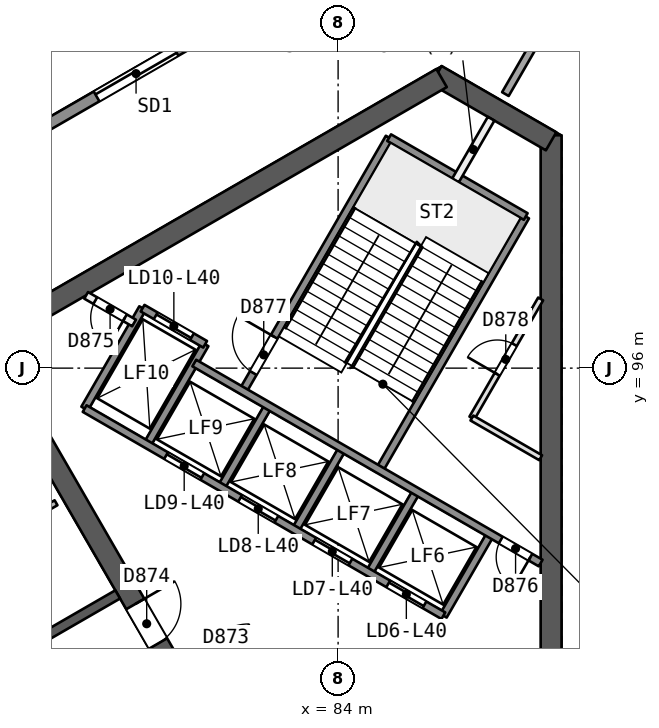
"""IFC4 building model, lengths in metres.
Left out: names, types, materials, properties, quantities, classifications, styles, units other than length and angle.
Written with IfcOpenShell. Run it as: python <this file> out.ifc"""

import sys

from ifc_helpers import new_model, si_unit, direction, frame, frame_2d, origin, place, context, subcontext, project, spatial, rectangle, extrude, element, fill, save


model = new_model("IFC4")
c1 = context("Model", 3, precision=1e-05, world=origin(), true_north=direction((0.0, 1.0)))
c2 = subcontext(c1, "Body", "Model", "MODEL_VIEW")
j1 = project(units=[si_unit("LENGTHUNIT", "METRE"), si_unit("PLANEANGLEUNIT", "RADIAN")], contexts=[c1])
p1 = place(None, origin())
s1 = spatial("IfcSite", under=j1, at=p1, CompositionType="ELEMENT")
p2 = place(p1, origin())
s2 = spatial("IfcBuilding", under=s1, at=p2, CompositionType="ELEMENT")
p3 = place(p2, frame((0.0, 0.0, 167.4)))
s3 = spatial("IfcBuildingStorey", under=s2, at=p3, CompositionType="ELEMENT", Elevation=167.4)
p4 = place(p3, frame((89.605, 88.069, 0.0), z_axis=(0.0, 0.0, 1.0), x_axis=(0.0, 1.0, 0.0)))
e1 = element("IfcWall", 1, at=p4, inside=s3, PredefinedType="SHEAR", context=c2, shape_type="SweptSolid", body=[
    extrude(rectangle(XDim=14.058, YDim=0.55, at=frame_2d((7.029, 0.0))), origin(), (0.0, 0.0, 1.0), 3.7),
])
p5 = place(p3, frame((89.605, 101.969, 0.0), z_axis=(0.0, 0.0, 1.0), x_axis=(-0.865997833373, 0.500047750313, 0.0)))
e2 = element("IfcWall", 2, at=p5, inside=s3, PredefinedType="SHEAR", context=c2, shape_type="SweptSolid", body=[
    extrude(rectangle(XDim=3.487, YDim=0.55, at=frame_2d((1.743, 0.0))), origin(), (0.0, 0.0, 1.0), 3.7),
])
p6 = place(p3, frame((86.723, 103.633, 0.0), z_axis=(0.0, 0.0, 1.0), x_axis=(-0.866023530946, -0.500003243837, 0.0)))
e3 = element("IfcWall", 3, at=p6, inside=s3, PredefinedType="SHEAR", context=c2, shape_type="SweptSolid", body=[
    extrude(rectangle(XDim=14.175, YDim=0.55, at=frame_2d((7.087, 0.0))), origin(), (0.0, 0.0, 1.0), 3.7),
])
p7 = place(p3, frame((74.686, 96.683, 0.0), z_axis=(0.0, 0.0, 1.0), x_axis=(0.499997818338, -0.866026663364, 0.0)))
e4 = element("IfcWall", 4, at=p7, inside=s3, PredefinedType="SHEAR", context=c2, shape_type="SweptSolid", body=[
    extrude(rectangle(XDim=10.105, YDim=0.55, at=frame_2d((5.052, 0.0))), origin(), (0.0, 0.0, 1.0), 3.7),
])
p8 = place(p7, frame((7.955, 0.0, 0.0)))
e5 = element("IfcOpeningElement", 5, at=p8, cuts=e4, PredefinedType="OPENING", context=c2, shape_type="SweptSolid", body=[
    extrude(rectangle(XDim=1.2, YDim=2.1, at=frame_2d((0.6, 1.05))), frame((0.0, 0.286, 0.0), z_axis=(0.0, -1.0, 0.0), x_axis=(1.0, 0.0, 0.0)), (0.0, 0.0, 1.0), 0.571),
])
p9 = place(p3, frame((78.2, 90.046, 0.0), z_axis=(0.0, 0.0, 1.0), x_axis=(-0.866026492143, -0.499998114903, 0.0)))
e6 = element("IfcWall", 6, at=p9, inside=s3, PredefinedType="SHEAR", context=c2, shape_type="SweptSolid", body=[
    extrude(rectangle(XDim=15.588, YDim=0.25, at=frame_2d((7.794, 0.0))), origin(), (0.0, 0.0, 1.0), 3.25),
])
p10 = place(p9, frame((3.138, 0.0, 0.0)))
e7 = element("IfcOpeningElement", 7, at=p10, cuts=e6, PredefinedType="OPENING", context=c2, shape_type="SweptSolid", body=[
    extrude(rectangle(XDim=1.0, YDim=2.1, at=frame_2d((0.5, 1.05))), frame((0.0, 0.135, 0.0), z_axis=(0.0, -1.0, 0.0), x_axis=(1.0, 0.0, 0.0)), (0.0, 0.0, 1.0), 0.271),
])
p11 = place(p9, frame((5.629, 0.0, 0.0)))
e8 = element("IfcOpeningElement", 8, at=p11, cuts=e6, PredefinedType="OPENING", context=c2, shape_type="SweptSolid", body=[
    extrude(rectangle(XDim=0.9, YDim=2.1, at=frame_2d((0.45, 1.05))), frame((0.0, 0.135, 0.0), z_axis=(0.0, -1.0, 0.0), x_axis=(1.0, 0.0, 0.0)), (0.0, 0.0, 1.0), 0.271),
])
p12 = place(p9, frame((8.435, 0.0, 0.0)))
e9 = element("IfcOpeningElement", 9, at=p12, cuts=e6, PredefinedType="OPENING", context=c2, shape_type="SweptSolid", body=[
    extrude(rectangle(XDim=0.9, YDim=2.1, at=frame_2d((0.45, 1.05))), frame((0.0, 0.135, 0.0), z_axis=(0.0, -1.0, 0.0), x_axis=(1.0, 0.0, 0.0)), (0.0, 0.0, 1.0), 0.271),
])
p13 = place(p9, frame((12.438, 0.0, 0.0)))
e10 = element("IfcOpeningElement", 10, at=p13, cuts=e6, PredefinedType="OPENING", context=c2, shape_type="SweptSolid", body=[
    extrude(rectangle(XDim=1.0, YDim=2.1, at=frame_2d((0.5, 1.05))), frame((0.0, 0.135, 0.0), z_axis=(0.0, -1.0, 0.0), x_axis=(1.0, 0.0, 0.0)), (0.0, 0.0, 1.0), 0.271),
])
p14 = place(p3, frame((91.267, 108.173, 0.0), z_axis=(0.0, 0.0, 1.0), x_axis=(-0.499979412418, -0.866037289704, 0.0)))
e11 = element("IfcWall", 11, at=p14, inside=s3, PredefinedType="PARTITIONING", context=c2, shape_type="SweptSolid", body=[
    extrude(rectangle(XDim=5.73, YDim=0.2, at=frame_2d((2.865, 0.0))), origin(), (0.0, 0.0, 1.0), 3.25),
])
p15 = place(p3, frame((74.498, 91.257, 0.0), z_axis=(0.0, 0.0, 1.0), x_axis=(0.866038271014, 0.499977712642, 0.0)))
e12 = element("IfcWall", 12, at=p15, inside=s3, PredefinedType="PARTITIONING", context=c2, shape_type="SweptSolid", body=[
    extrude(rectangle(XDim=2.401, YDim=0.15, at=frame_2d((1.2, 0.0))), origin(), (0.0, 0.0, 1.0), 3.25),
])
p16 = place(p3, frame((42.319, 82.755, 0.0), z_axis=(0.0, 0.0, 1.0), x_axis=(0.866024017239, 0.50000240156, 0.0)))
e13 = element("IfcWall", 13, at=p16, inside=s3, PredefinedType="SOLIDWALL", context=c2, shape_type="SweptSolid", body=[
    extrude(rectangle(XDim=53.85, YDim=0.3, at=frame_2d((26.925, 0.0))), origin(), (0.0, 0.0, 1.0), 3.25),
])
p17 = place(p16, frame((20.581, 0.0, 0.0)))
e14 = element("IfcOpeningElement", 14, at=p17, cuts=e13, PredefinedType="OPENING", context=c2, shape_type="SweptSolid", body=[
    extrude(rectangle(XDim=2.4, YDim=2.4, at=frame_2d((1.2, 1.2))), frame((0.0, 0.161, 0.0), z_axis=(0.0, -1.0, 0.0), x_axis=(1.0, 0.0, 0.0)), (0.0, 0.0, 1.0), 0.321),
])
p18 = place(p16, frame((9.622, 0.0, 0.0)))
e15 = element("IfcOpeningElement", 15, at=p18, cuts=e13, PredefinedType="OPENING", context=c2, shape_type="SweptSolid", body=[
    extrude(rectangle(XDim=2.4, YDim=2.4, at=frame_2d((1.2, 1.2))), frame((0.0, 0.161, 0.0), z_axis=(0.0, -1.0, 0.0), x_axis=(1.0, 0.0, 0.0)), (0.0, 0.0, 1.0), 0.321),
])
p19 = place(p16, frame((40.79, 0.0, 0.0)))
e16 = element("IfcOpeningElement", 16, at=p19, cuts=e13, PredefinedType="OPENING", context=c2, shape_type="SweptSolid", body=[
    extrude(rectangle(XDim=2.4, YDim=2.4, at=frame_2d((1.2, 1.2))), frame((0.0, 0.161, 0.0), z_axis=(0.0, -1.0, 0.0), x_axis=(1.0, 0.0, 0.0)), (0.0, 0.0, 1.0), 0.321),
])
p20 = place(p16, frame((27.74, 0.0, 0.9)))
e17 = element("IfcOpeningElement", 17, at=p20, cuts=e13, PredefinedType="OPENING", context=c2, shape_type="SweptSolid", body=[
    extrude(rectangle(XDim=1.8, YDim=1.5, at=frame_2d((0.9, 0.75))), frame((0.0, 0.161, 0.0), z_axis=(0.0, -1.0, 0.0), x_axis=(1.0, 0.0, 0.0)), (0.0, 0.0, 1.0), 0.321),
])
p21 = place(p16, frame((24.934, 0.0, 0.9)))
e18 = element("IfcOpeningElement", 18, at=p21, cuts=e13, PredefinedType="OPENING", context=c2, shape_type="SweptSolid", body=[
    extrude(rectangle(XDim=1.8, YDim=1.5, at=frame_2d((0.9, 0.75))), frame((0.0, 0.161, 0.0), z_axis=(0.0, -1.0, 0.0), x_axis=(1.0, 0.0, 0.0)), (0.0, 0.0, 1.0), 0.321),
])
p22 = place(p3, frame((86.77, 89.486, 0.0), z_axis=(0.0, 0.0, 1.0), x_axis=(0.499961042966, 0.86604789447, 0.0)))
e19 = element("IfcWall", 19, at=p22, inside=s3, PredefinedType="SOLIDWALL", context=c2, shape_type="SweptSolid", body=[
    extrude(rectangle(XDim=2.48, YDim=0.2, at=frame_2d((1.24, 0.0))), origin(), (0.0, 0.0, 1.0), 3.25),
])
p23 = place(p3, frame((87.521, 94.687, 0.0), z_axis=(0.0, 0.0, 1.0), x_axis=(0.500043727655, 0.866000156139, 0.0)))
e20 = element("IfcWall", 20, at=p23, inside=s3, PredefinedType="PARTITIONING", context=c2, shape_type="SweptSolid", body=[
    extrude(rectangle(XDim=3.618, YDim=0.15, at=frame_2d((1.809, 0.0))), origin(), (0.0, 0.0, 1.0), 3.25),
])
p24 = place(p23, frame((1.332, 0.0, 0.0)))
e21 = element("IfcOpeningElement", 21, at=p24, cuts=e20, PredefinedType="OPENING", context=c2, shape_type="SweptSolid", body=[
    extrude(rectangle(XDim=0.9, YDim=2.1, at=frame_2d((0.45, 1.05))), frame((0.0, 0.085, 0.0), z_axis=(0.0, -1.0, 0.0), x_axis=(1.0, 0.0, 0.0)), (0.0, 0.0, 1.0), 0.171),
])
p25 = place(p3, frame((84.821, 90.611, 0.0), z_axis=(0.0, 0.0, 1.0), x_axis=(0.499961042966, 0.86604789447, 0.0)))
e22 = element("IfcWall", 22, at=p25, inside=s3, PredefinedType="SOLIDWALL", context=c2, shape_type="SweptSolid", body=[
    extrude(rectangle(XDim=2.48, YDim=0.2, at=frame_2d((1.24, 0.0))), origin(), (0.0, 0.0, 1.0), 3.25),
])
p26 = place(p3, frame((85.087, 93.321, 0.0), z_axis=(0.0, 0.0, 1.0), x_axis=(0.500019787375, 0.866013979237, 0.0)))
e23 = element("IfcWall", 23, at=p26, inside=s3, PredefinedType="SOLIDWALL", context=c2, shape_type="SweptSolid", body=[
    extrude(rectangle(XDim=7.7, YDim=0.2, at=frame_2d((3.85, 0.0))), origin(), (0.0, 0.0, 1.0), 3.25),
])
p27 = place(p3, frame((82.873, 91.736, 0.0), z_axis=(0.0, 0.0, 1.0), x_axis=(0.499961042966, 0.86604789447, 0.0)))
e24 = element("IfcWall", 24, at=p27, inside=s3, PredefinedType="SOLIDWALL", context=c2, shape_type="SweptSolid", body=[
    extrude(rectangle(XDim=2.48, YDim=0.2, at=frame_2d((1.24, 0.0))), origin(), (0.0, 0.0, 1.0), 3.25),
])
p28 = place(p3, frame((87.09, 100.94, 0.0), z_axis=(0.0, 0.0, 1.0), x_axis=(0.499951854219, 0.86605319898, 0.0)))
e25 = element("IfcWall", 25, at=p28, inside=s3, PredefinedType="PARTITIONING", context=c2, shape_type="SweptSolid", body=[
    extrude(rectangle(XDim=1.873, YDim=0.2, at=frame_2d((0.937, 0.0))), origin(), (0.0, 0.0, 1.0), 3.25),
])
p29 = place(p3, frame((80.924, 92.861, 0.0), z_axis=(0.0, 0.0, 1.0), x_axis=(0.499961042966, 0.86604789447, 0.0)))
e26 = element("IfcWall", 26, at=p29, inside=s3, PredefinedType="SOLIDWALL", context=c2, shape_type="SweptSolid", body=[
    extrude(rectangle(XDim=2.48, YDim=0.2, at=frame_2d((1.24, 0.0))), origin(), (0.0, 0.0, 1.0), 3.25),
])
p30 = place(p3, frame((81.493, 95.396, 0.0), z_axis=(0.0, 0.0, 1.0), x_axis=(0.500006057782, 0.866021906294, 0.0)))
e27 = element("IfcWall", 27, at=p30, inside=s3, PredefinedType="SOLIDWALL", context=c2, shape_type="SweptSolid", body=[
    extrude(rectangle(XDim=7.7, YDim=0.2, at=frame_2d((3.85, 0.0))), origin(), (0.0, 0.0, 1.0), 3.25),
])
p31 = place(p30, frame((0.55, 0.0, 0.0)))
e28 = element("IfcOpeningElement", 28, at=p31, cuts=e27, PredefinedType="OPENING", context=c2, shape_type="SweptSolid", body=[
    extrude(rectangle(XDim=1.1, YDim=2.1, at=frame_2d((0.55, 1.05))), frame((0.0, 0.11, 0.0), z_axis=(0.0, -1.0, 0.0), x_axis=(1.0, 0.0, 0.0)), (0.0, 0.0, 1.0), 0.221),
])
for number, where, z_axis, x_axis in (
    (29, (78.976, 93.986, 0.0), (0.0, 0.0, 1.0), (0.5, 0.866, 0.0)),
    (30, (77.33, 94.936, 0.0), (0.0, 0.0, 1.0), (0.5, 0.866, 0.0)),
):
    element("IfcWall", number, at=place(p3, frame(where, z_axis=z_axis, x_axis=x_axis)), inside=s3, PredefinedType="SOLIDWALL", context=c2, shape_type="SweptSolid", body=[
        extrude(rectangle(XDim=3.05, YDim=0.2, at=frame_2d((1.525, 0.0))), origin(), (0.0, 0.0, 1.0), 3.25),
    ])
p32 = place(p3, frame((86.77, 89.486, 0.0), z_axis=(0.0, 0.0, 1.0), x_axis=(-0.86601811187, 0.500012629753, 0.0)))
e31 = element("IfcWall", 31, at=p32, inside=s3, PredefinedType="SOLIDWALL", context=c2, shape_type="SweptSolid", body=[
    extrude(rectangle(XDim=10.9, YDim=0.2, at=frame_2d((5.45, 0.0))), origin(), (0.0, 0.0, 1.0), 3.25),
])
p33 = place(p32, frame((0.575, 0.0, 0.0)))
e32 = element("IfcOpeningElement", 32, at=p33, cuts=e31, PredefinedType="OPENING", context=c2, shape_type="SweptSolid", body=[
    extrude(rectangle(XDim=1.1, YDim=2.1, at=frame_2d((0.55, 1.05))), frame((0.0, 0.11, 0.0), z_axis=(0.0, -1.0, 0.0), x_axis=(1.0, 0.0, 0.0)), (0.0, 0.0, 1.0), 0.221),
])
p34 = place(p32, frame((2.825, 0.0, 0.0)))
e33 = element("IfcOpeningElement", 33, at=p34, cuts=e31, PredefinedType="OPENING", context=c2, shape_type="SweptSolid", body=[
    extrude(rectangle(XDim=1.1, YDim=2.1, at=frame_2d((0.55, 1.05))), frame((0.0, 0.11, 0.0), z_axis=(0.0, -1.0, 0.0), x_axis=(1.0, 0.0, 0.0)), (0.0, 0.0, 1.0), 0.221),
])
p35 = place(p32, frame((5.075, 0.0, 0.0)))
e34 = element("IfcOpeningElement", 34, at=p35, cuts=e31, PredefinedType="OPENING", context=c2, shape_type="SweptSolid", body=[
    extrude(rectangle(XDim=1.1, YDim=2.1, at=frame_2d((0.55, 1.05))), frame((0.0, 0.11, 0.0), z_axis=(0.0, -1.0, 0.0), x_axis=(1.0, 0.0, 0.0)), (0.0, 0.0, 1.0), 0.221),
])
p36 = place(p32, frame((7.325, 0.0, 0.0)))
e35 = element("IfcOpeningElement", 35, at=p36, cuts=e31, PredefinedType="OPENING", context=c2, shape_type="SweptSolid", body=[
    extrude(rectangle(XDim=1.1, YDim=2.1, at=frame_2d((0.55, 1.05))), frame((0.0, 0.11, 0.0), z_axis=(0.0, -1.0, 0.0), x_axis=(1.0, 0.0, 0.0)), (0.0, 0.0, 1.0), 0.221),
])
p37 = place(p3, frame((89.33, 90.872, 0.0), z_axis=(0.0, 0.0, 1.0), x_axis=(-0.866027589512, 0.49999621419, 0.0)))
e36 = element("IfcWall", 36, at=p37, inside=s3, PredefinedType="SOLIDWALL", context=c2, shape_type="SweptSolid", body=[
    extrude(rectangle(XDim=10.524, YDim=0.2, at=frame_2d((5.262, 0.0))), origin(), (0.0, 0.0, 1.0), 3.25),
])
p38 = place(p37, frame((0.312, 0.0, 0.0)))
e37 = element("IfcOpeningElement", 37, at=p38, cuts=e36, PredefinedType="OPENING", context=c2, shape_type="SweptSolid", body=[
    extrude(rectangle(XDim=0.9, YDim=2.1, at=frame_2d((0.45, 1.05))), frame((0.0, 0.11, 0.0), z_axis=(0.0, -1.0, 0.0), x_axis=(1.0, 0.0, 0.0)), (0.0, 0.0, 1.0), 0.221),
])
p39 = place(p3, frame((78.63, 97.188, 0.0), z_axis=(0.0, 0.0, 1.0), x_axis=(-0.866003949776, 0.500037157592, 0.0)))
e38 = element("IfcWall", 38, at=p39, inside=s3, PredefinedType="PARTITIONING", context=c2, shape_type="SweptSolid", body=[
    extrude(rectangle(XDim=1.455, YDim=0.2, at=frame_2d((0.728, 0.0))), origin(), (0.0, 0.0, 1.0), 3.25),
])
p40 = place(p39, frame((0.278, 0.0, 0.0)))
e39 = element("IfcOpeningElement", 39, at=p40, cuts=e38, PredefinedType="OPENING", context=c2, shape_type="SweptSolid", body=[
    extrude(rectangle(XDim=0.9, YDim=2.1, at=frame_2d((0.45, 1.05))), frame((0.0, 0.11, 0.0), z_axis=(0.0, -1.0, 0.0), x_axis=(1.0, 0.0, 0.0)), (0.0, 0.0, 1.0), 0.221),
])
p41 = place(p3, frame((80.5, 96.627, 0.0), z_axis=(0.0, 0.0, 1.0), x_axis=(-0.86601224135, 0.500022797313, 0.0)))
e40 = element("IfcWall", 40, at=p41, inside=s3, PredefinedType="SOLIDWALL", context=c2, shape_type="SweptSolid", body=[
    extrude(rectangle(XDim=1.9, YDim=0.2, at=frame_2d((0.95, 0.0))), origin(), (0.0, 0.0, 1.0), 3.25),
])
p42 = place(p41, frame((0.4, 0.0, 0.0)))
e41 = element("IfcOpeningElement", 41, at=p42, cuts=e40, PredefinedType="OPENING", context=c2, shape_type="SweptSolid", body=[
    extrude(rectangle(XDim=1.1, YDim=2.1, at=frame_2d((0.55, 1.05))), frame((0.0, 0.11, 0.0), z_axis=(0.0, -1.0, 0.0), x_axis=(1.0, 0.0, 0.0)), (0.0, 0.0, 1.0), 0.221),
])
p43 = place(p3, frame((89.33, 93.643, 0.0), z_axis=(0.0, 0.0, 1.0), x_axis=(-0.866033778982, 0.499985493453, 0.0)))
e42 = element("IfcWall", 42, at=p43, inside=s3, PredefinedType="PARTITIONING", context=c2, shape_type="SweptSolid", body=[
    extrude(rectangle(XDim=2.089, YDim=0.15, at=frame_2d((1.044, 0.0))), origin(), (0.0, 0.0, 1.0), 3.25),
])
p44 = place(p3, frame((88.937, 99.99, 0.0), z_axis=(0.0, 0.0, 1.0), x_axis=(-0.866004344652, 0.500036473714, 0.0)))
e43 = element("IfcWall", 43, at=p44, inside=s3, PredefinedType="SOLIDWALL", context=c2, shape_type="SweptSolid", body=[
    extrude(rectangle(XDim=4.15, YDim=0.2, at=frame_2d((2.075, 0.0))), origin(), (0.0, 0.0, 1.0), 3.25),
])
p45 = place(p19, origin())
e44 = element("IfcDoor", 44, at=p45, inside=s3, OperationType="SLIDING_TO_LEFT", PredefinedType="NOTDEFINED", context=c2, shape_type="SweptSolid", body=[
    extrude(rectangle(XDim=2.4, YDim=2.4, at=frame_2d((1.2, 1.2))), frame((0.0, 0.025, 0.0), z_axis=(0.0, -1.0, 0.0), x_axis=(1.0, 0.0, 0.0)), (0.0, 0.0, 1.0), 0.05),
])
fill(e16, e44)
p46 = place(p8, origin())
e45 = element("IfcDoor", 45, at=p46, inside=s3, OperationType="SINGLE_SWING_LEFT", PredefinedType="NOTDEFINED", context=c2, shape_type="SweptSolid", body=[
    extrude(rectangle(XDim=1.2, YDim=2.1, at=frame_2d((0.6, 1.05))), frame((0.0, 0.025, 0.0), z_axis=(0.0, -1.0, 0.0), x_axis=(1.0, 0.0, 0.0)), (0.0, 0.0, 1.0), 0.05),
])
fill(e5, e45)
p47 = place(p33, origin())
e46 = element("IfcDoor", 46, at=p47, inside=s3, OperationType="SLIDING_TO_RIGHT", PredefinedType="NOTDEFINED", context=c2, shape_type="SweptSolid", body=[
    extrude(rectangle(XDim=1.1, YDim=2.1, at=frame_2d((0.55, 1.05))), frame((0.0, 0.025, 0.0), z_axis=(0.0, -1.0, 0.0), x_axis=(1.0, 0.0, 0.0)), (0.0, 0.0, 1.0), 0.05),
])
fill(e32, e46)
p48 = place(p34, origin())
e47 = element("IfcDoor", 47, at=p48, inside=s3, OperationType="SLIDING_TO_LEFT", PredefinedType="NOTDEFINED", context=c2, shape_type="SweptSolid", body=[
    extrude(rectangle(XDim=1.1, YDim=2.1, at=frame_2d((0.55, 1.05))), frame((0.0, 0.025, 0.0), z_axis=(0.0, -1.0, 0.0), x_axis=(1.0, 0.0, 0.0)), (0.0, 0.0, 1.0), 0.05),
])
fill(e33, e47)
p49 = place(p35, origin())
e48 = element("IfcDoor", 48, at=p49, inside=s3, OperationType="SLIDING_TO_RIGHT", PredefinedType="NOTDEFINED", context=c2, shape_type="SweptSolid", body=[
    extrude(rectangle(XDim=1.1, YDim=2.1, at=frame_2d((0.55, 1.05))), frame((0.0, 0.025, 0.0), z_axis=(0.0, -1.0, 0.0), x_axis=(1.0, 0.0, 0.0)), (0.0, 0.0, 1.0), 0.05),
])
fill(e34, e48)
p50 = place(p36, origin())
e49 = element("IfcDoor", 49, at=p50, inside=s3, OperationType="SLIDING_TO_LEFT", PredefinedType="NOTDEFINED", context=c2, shape_type="SweptSolid", body=[
    extrude(rectangle(XDim=1.1, YDim=2.1, at=frame_2d((0.55, 1.05))), frame((0.0, 0.025, 0.0), z_axis=(0.0, -1.0, 0.0), x_axis=(1.0, 0.0, 0.0)), (0.0, 0.0, 1.0), 0.05),
])
fill(e35, e49)
p51 = place(p42, origin())
e50 = element("IfcDoor", 50, at=p51, inside=s3, OperationType="SLIDING_TO_RIGHT", PredefinedType="NOTDEFINED", context=c2, shape_type="SweptSolid", body=[
    extrude(rectangle(XDim=1.1, YDim=2.1, at=frame_2d((0.55, 1.05))), frame((0.0, 0.025, 0.0), z_axis=(0.0, -1.0, 0.0), x_axis=(1.0, 0.0, 0.0)), (0.0, 0.0, 1.0), 0.05),
])
fill(e41, e50)
p52 = place(p40, origin())
e51 = element("IfcDoor", 51, at=p52, inside=s3, OperationType="SINGLE_SWING_LEFT", PredefinedType="NOTDEFINED", context=c2, shape_type="SweptSolid", body=[
    extrude(rectangle(XDim=0.9, YDim=2.1, at=frame_2d((0.45, 1.05))), frame((0.0, 0.025, 0.0), z_axis=(0.0, -1.0, 0.0), x_axis=(1.0, 0.0, 0.0)), (0.0, 0.0, 1.0), 0.05),
])
fill(e39, e51)
p53 = place(p38, origin())
e52 = element("IfcDoor", 52, at=p53, inside=s3, OperationType="SINGLE_SWING_LEFT", PredefinedType="NOTDEFINED", context=c2, shape_type="SweptSolid", body=[
    extrude(rectangle(XDim=0.9, YDim=2.1, at=frame_2d((0.45, 1.05))), frame((0.0, 0.025, 0.0), z_axis=(0.0, -1.0, 0.0), x_axis=(1.0, 0.0, 0.0)), (0.0, 0.0, 1.0), 0.05),
])
fill(e37, e52)
p54 = place(p31, origin())
e53 = element("IfcDoor", 53, at=p54, inside=s3, OperationType="SINGLE_SWING_RIGHT", PredefinedType="NOTDEFINED", context=c2, shape_type="SweptSolid", body=[
    extrude(rectangle(XDim=1.1, YDim=2.1, at=frame_2d((0.55, 1.05))), frame((0.0, 0.025, 0.0), z_axis=(0.0, -1.0, 0.0), x_axis=(1.0, 0.0, 0.0)), (0.0, 0.0, 1.0), 0.05),
])
fill(e28, e53)
p55 = place(p24, origin())
e54 = element("IfcDoor", 54, at=p55, inside=s3, OperationType="SINGLE_SWING_LEFT", PredefinedType="NOTDEFINED", context=c2, shape_type="SweptSolid", body=[
    extrude(rectangle(XDim=0.9, YDim=2.1, at=frame_2d((0.45, 1.05))), frame((0.0, 0.025, 0.0), z_axis=(0.0, -1.0, 0.0), x_axis=(1.0, 0.0, 0.0)), (0.0, 0.0, 1.0), 0.05),
])
fill(e21, e54)
save(model, sys.argv[1])
